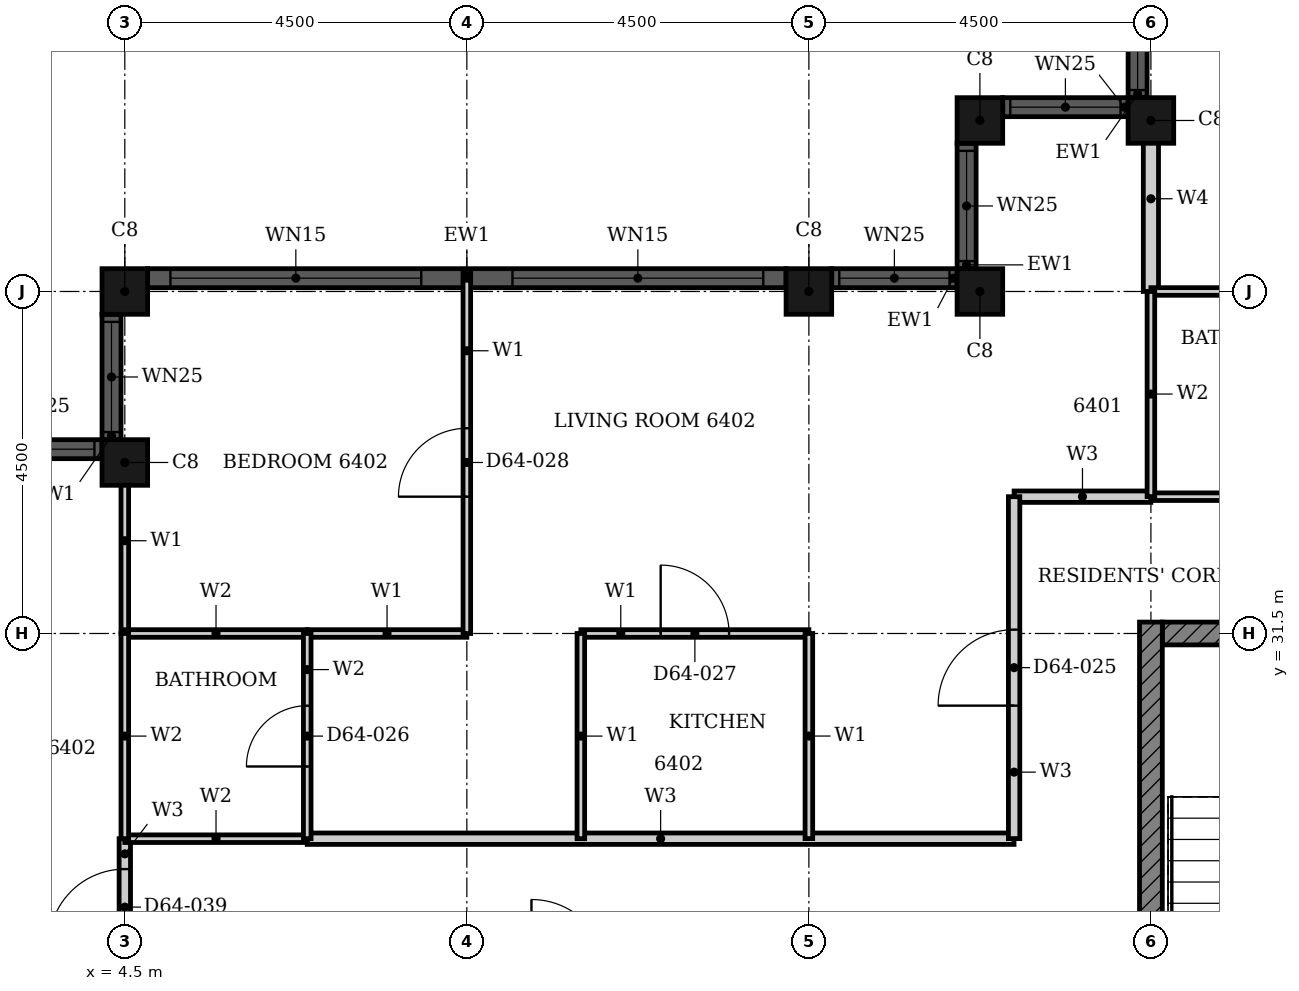
"""IFC4 building model, lengths in metres.
Left out: names, types, materials, properties, quantities, classifications, styles, units other than length and angle.
Written with IfcOpenShell. Run it as: python <this file> out.ifc"""

import sys

from ifc_helpers import new_model, si_unit, direction, frame, frame_2d, origin, origin_2d, place, context, subcontext, project, spatial, rectangle, hollow_rectangle, extrude, element, fill, save


model = new_model("IFC4")
c1 = context("Model", 3, precision=1e-05, world=origin(), true_north=direction((0.0, 1.0)))
c2 = subcontext(c1, "Body", "Model", "MODEL_VIEW")
j1 = project(units=[si_unit("LENGTHUNIT", "METRE"), si_unit("PLANEANGLEUNIT", "RADIAN")], contexts=[c1])
p1 = place(None, origin())
s1 = spatial("IfcSite", under=j1, at=p1, CompositionType="ELEMENT")
p2 = place(p1, origin())
s2 = spatial("IfcBuilding", under=s1, at=p2, CompositionType="ELEMENT")
p3 = place(p2, frame((0.0, 0.0, 252.7)))
s3 = spatial("IfcBuildingStorey", under=s2, at=p3, CompositionType="ELEMENT", Elevation=252.7)
for number, where, z_axis, x_axis in (
    (1, (18.0, 38.25, 0.0), (0.0, 0.0, 1.0), (1.0, 0.0, 0.0)),
    (2, (15.75, 38.25, 0.0), (0.0, 0.0, 1.0), (1.0, 0.0, 0.0)),
    (3, (15.75, 36.0, 0.0), (0.0, 0.0, 1.0), (1.0, 0.0, 0.0)),
    (4, (13.5, 36.0, 0.0), (0.0, 0.0, 1.0), (1.0, 0.0, 0.0)),
    (5, (4.5, 36.0, 0.0), (0.0, 0.0, 1.0), (1.0, 0.0, 0.0)),
    (6, (4.5, 33.75, 0.0), (0.0, 0.0, 1.0), (1.0, 0.0, 0.0)),
):
    element("IfcColumn", number, at=place(p3, frame(where, z_axis=z_axis, x_axis=x_axis)), inside=s3, PredefinedType="COLUMN", context=c2, shape_type="SweptSolid", body=[
        extrude(hollow_rectangle(XDim=0.6, YDim=0.6, WallThickness=0.02, at=origin_2d()), origin(), (0.0, 0.0, 1.0), 3.7),
    ])
p4 = place(p3, frame((17.825, 40.2, 0.0), z_axis=(0.0, 0.0, 1.0), x_axis=(0.0, -1.0, 0.0)))
e7 = element("IfcWall", 7, at=p4, inside=s3, PredefinedType="SOLIDWALL", context=c2, shape_type="SweptSolid", body=[
    extrude(rectangle(XDim=1.65, YDim=0.25, at=frame_2d((0.825, 0.0))), origin(), (0.0, 0.0, 1.0), 3.7),
])
p5 = place(p4, frame((0.1, 0.0, 0.9)))
e8 = element("IfcOpeningElement", 8, at=p5, cuts=e7, PredefinedType="OPENING", context=c2, shape_type="SweptSolid", body=[
    extrude(rectangle(XDim=1.45, YDim=1.85, at=frame_2d((0.725, 0.925))), frame((0.0, 0.135, 0.0), z_axis=(0.0, -1.0, 0.0), x_axis=(1.0, 0.0, 0.0)), (0.0, 0.0, 1.0), 0.27),
])
p6 = place(p3, frame((17.7, 38.425, 0.0), z_axis=(0.0, 0.0, 1.0), x_axis=(-1.0, 0.0, 0.0)))
e9 = element("IfcWall", 9, at=p6, inside=s3, PredefinedType="SOLIDWALL", context=c2, shape_type="SweptSolid", body=[
    extrude(rectangle(XDim=1.65, YDim=0.25, at=frame_2d((0.825, 0.0))), origin(), (0.0, 0.0, 1.0), 3.7),
])
p7 = place(p6, frame((0.1, 0.0, 0.9)))
e10 = element("IfcOpeningElement", 10, at=p7, cuts=e9, PredefinedType="OPENING", context=c2, shape_type="SweptSolid", body=[
    extrude(rectangle(XDim=1.45, YDim=1.85, at=frame_2d((0.725, 0.925))), frame((0.0, 0.135, 0.0), z_axis=(0.0, -1.0, 0.0), x_axis=(1.0, 0.0, 0.0)), (0.0, 0.0, 1.0), 0.27),
])
p8 = place(p3, frame((15.575, 37.95, 0.0), z_axis=(0.0, 0.0, 1.0), x_axis=(0.0, -1.0, 0.0)))
e11 = element("IfcWall", 11, at=p8, inside=s3, PredefinedType="SOLIDWALL", context=c2, shape_type="SweptSolid", body=[
    extrude(rectangle(XDim=1.65, YDim=0.25, at=frame_2d((0.825, 0.0))), origin(), (0.0, 0.0, 1.0), 3.7),
])
p9 = place(p8, frame((0.1, 0.0, 0.9)))
e12 = element("IfcOpeningElement", 12, at=p9, cuts=e11, PredefinedType="OPENING", context=c2, shape_type="SweptSolid", body=[
    extrude(rectangle(XDim=1.45, YDim=1.85, at=frame_2d((0.725, 0.925))), frame((0.0, 0.135, 0.0), z_axis=(0.0, -1.0, 0.0), x_axis=(1.0, 0.0, 0.0)), (0.0, 0.0, 1.0), 0.27),
])
p10 = place(p3, frame((15.45, 36.175, 0.0), z_axis=(0.0, 0.0, 1.0), x_axis=(-1.0, 0.0, 0.0)))
e13 = element("IfcWall", 13, at=p10, inside=s3, PredefinedType="SOLIDWALL", context=c2, shape_type="SweptSolid", body=[
    extrude(rectangle(XDim=1.65, YDim=0.25, at=frame_2d((0.825, 0.0))), origin(), (0.0, 0.0, 1.0), 3.7),
])
p11 = place(p10, frame((0.1, 0.0, 0.9)))
e14 = element("IfcOpeningElement", 14, at=p11, cuts=e13, PredefinedType="OPENING", context=c2, shape_type="SweptSolid", body=[
    extrude(rectangle(XDim=1.45, YDim=1.85, at=frame_2d((0.725, 0.925))), frame((0.0, 0.135, 0.0), z_axis=(0.0, -1.0, 0.0), x_axis=(1.0, 0.0, 0.0)), (0.0, 0.0, 1.0), 0.27),
])
p12 = place(p3, frame((13.2, 36.175, 0.0), z_axis=(0.0, 0.0, 1.0), x_axis=(-1.0, 0.0, 0.0)))
e15 = element("IfcWall", 15, at=p12, inside=s3, PredefinedType="SOLIDWALL", context=c2, shape_type="SweptSolid", body=[
    extrude(rectangle(XDim=8.4, YDim=0.25, at=frame_2d((4.2, 0.0))), origin(), (0.0, 0.0, 1.0), 3.7),
])
p13 = place(p12, frame((0.3, 0.0, 0.45)))
e16 = element("IfcOpeningElement", 16, at=p13, cuts=e15, PredefinedType="OPENING", context=c2, shape_type="SweptSolid", body=[
    extrude(rectangle(XDim=3.3, YDim=2.3, at=frame_2d((1.65, 1.15))), frame((0.0, 0.135, 0.0), z_axis=(0.0, -1.0, 0.0), x_axis=(1.0, 0.0, 0.0)), (0.0, 0.0, 1.0), 0.27),
])
p14 = place(p12, frame((4.8, 0.0, 0.45)))
e17 = element("IfcOpeningElement", 17, at=p14, cuts=e15, PredefinedType="OPENING", context=c2, shape_type="SweptSolid", body=[
    extrude(rectangle(XDim=3.3, YDim=2.3, at=frame_2d((1.65, 1.15))), frame((0.0, 0.135, 0.0), z_axis=(0.0, -1.0, 0.0), x_axis=(1.0, 0.0, 0.0)), (0.0, 0.0, 1.0), 0.27),
])
p15 = place(p3, frame((4.325, 35.7, 0.0), z_axis=(0.0, 0.0, 1.0), x_axis=(0.0, -1.0, 0.0)))
e18 = element("IfcWall", 18, at=p15, inside=s3, PredefinedType="SOLIDWALL", context=c2, shape_type="SweptSolid", body=[
    extrude(rectangle(XDim=1.65, YDim=0.25, at=frame_2d((0.825, 0.0))), origin(), (0.0, 0.0, 1.0), 3.7),
])
p16 = place(p15, frame((0.1, 0.0, 0.9)))
e19 = element("IfcOpeningElement", 19, at=p16, cuts=e18, PredefinedType="OPENING", context=c2, shape_type="SweptSolid", body=[
    extrude(rectangle(XDim=1.45, YDim=1.85, at=frame_2d((0.725, 0.925))), frame((0.0, 0.135, 0.0), z_axis=(0.0, -1.0, 0.0), x_axis=(1.0, 0.0, 0.0)), (0.0, 0.0, 1.0), 0.27),
])
p17 = place(p3, frame((4.2, 33.925, 0.0), z_axis=(0.0, 0.0, 1.0), x_axis=(-1.0, 0.0, 0.0)))
e20 = element("IfcWall", 20, at=p17, inside=s3, PredefinedType="SOLIDWALL", context=c2, shape_type="SweptSolid", body=[
    extrude(rectangle(XDim=1.65, YDim=0.25, at=frame_2d((0.825, 0.0))), origin(), (0.0, 0.0, 1.0), 3.7),
])
p18 = place(p17, frame((0.1, 0.0, 0.9)))
e21 = element("IfcOpeningElement", 21, at=p18, cuts=e20, PredefinedType="OPENING", context=c2, shape_type="SweptSolid", body=[
    extrude(rectangle(XDim=1.45, YDim=1.85, at=frame_2d((0.725, 0.925))), frame((0.0, 0.135, 0.0), z_axis=(0.0, -1.0, 0.0), x_axis=(1.0, 0.0, 0.0)), (0.0, 0.0, 1.0), 0.27),
])
p19 = place(p3, frame((18.15, 31.5, 0.0), z_axis=(0.0, 0.0, 1.0), x_axis=(1.0, 0.0, 0.0)))
e22 = element("IfcWall", 22, at=p19, inside=s3, PredefinedType="SHEAR", context=c2, shape_type="SweptSolid", body=[
    extrude(rectangle(XDim=9.368, YDim=0.3, at=frame_2d((4.684, 0.0))), origin(), (0.0, 0.0, 1.0), 3.4),
])
p20 = place(p19, frame((4.736, 0.0, 0.0)))
e23 = element("IfcOpeningElement", 23, at=p20, cuts=e22, PredefinedType="OPENING", context=c2, shape_type="SweptSolid", body=[
    extrude(rectangle(XDim=1.8, YDim=2.1, at=frame_2d((0.9, 1.05))), frame((0.0, 0.16, 0.0), z_axis=(0.0, -1.0, 0.0), x_axis=(1.0, 0.0, 0.0)), (0.0, 0.0, 1.0), 0.32),
])
p21 = place(p3, frame((18.0, 22.35, 0.0), z_axis=(0.0, 0.0, 1.0), x_axis=(0.0, 1.0, 0.0)))
e24 = element("IfcWall", 24, at=p21, inside=s3, PredefinedType="SHEAR", context=c2, shape_type="SweptSolid", body=[
    extrude(rectangle(XDim=9.3, YDim=0.3, at=frame_2d((4.65, 0.0))), origin(), (0.0, 0.0, 1.0), 3.4),
])
p22 = place(p3, frame((6.9, 28.8, 0.0), z_axis=(0.0, 0.0, 1.0), x_axis=(1.0, 0.0, 0.0)))
e25 = element("IfcWall", 25, at=p22, inside=s3, PredefinedType="PARTITIONING", context=c2, shape_type="SweptSolid", body=[
    extrude(rectangle(XDim=9.299, YDim=0.15, at=frame_2d((4.649, 0.0))), origin(), (0.0, 0.0, 1.0), 3.4),
])
p23 = place(p3, frame((16.2, 33.3, 0.0), z_axis=(0.0, 0.0, 1.0), x_axis=(1.0, 0.0, 0.0)))
e26 = element("IfcWall", 26, at=p23, inside=s3, PredefinedType="PARTITIONING", context=c2, shape_type="SweptSolid", body=[
    extrude(rectangle(XDim=1.799, YDim=0.15, at=frame_2d((0.899, 0.0))), origin(), (0.0, 0.0, 1.0), 3.4),
])
p24 = place(p3, frame((16.2, 28.801, 0.0), z_axis=(0.0, 0.0, 1.0), x_axis=(0.0, 1.0, 0.0)))
e27 = element("IfcWall", 27, at=p24, inside=s3, PredefinedType="PARTITIONING", context=c2, shape_type="SweptSolid", body=[
    extrude(rectangle(XDim=4.499, YDim=0.15, at=frame_2d((2.25, 0.0))), origin(), (0.0, 0.0, 1.0), 3.4),
])
p25 = place(p24, frame((1.75, 0.0, 0.0)))
e28 = element("IfcOpeningElement", 28, at=p25, cuts=e27, PredefinedType="OPENING", context=c2, shape_type="SweptSolid", body=[
    extrude(rectangle(XDim=1.0, YDim=2.2, at=frame_2d((0.5, 1.1))), frame((0.0, 0.085, 0.0), z_axis=(0.0, -1.0, 0.0), x_axis=(1.0, 0.0, 0.0)), (0.0, 0.0, 1.0), 0.17),
])
p26 = place(p3, frame((4.5, 27.0, 0.0), z_axis=(0.0, 0.0, 1.0), x_axis=(0.0, 1.0, 0.0)))
e29 = element("IfcWall", 29, at=p26, inside=s3, PredefinedType="PARTITIONING", context=c2, shape_type="SweptSolid", body=[
    extrude(rectangle(XDim=1.8, YDim=0.15, at=frame_2d((0.9, 0.0))), origin(), (0.0, 0.0, 1.0), 3.4),
])
p27 = place(p26, frame((0.4, 0.0, 0.0)))
e30 = element("IfcOpeningElement", 30, at=p27, cuts=e29, PredefinedType="OPENING", context=c2, shape_type="SweptSolid", body=[
    extrude(rectangle(XDim=1.0, YDim=2.1, at=frame_2d((0.5, 1.05))), frame((0.0, 0.085, 0.0), z_axis=(0.0, -1.0, 0.0), x_axis=(1.0, 0.0, 0.0)), (0.0, 0.0, 1.0), 0.17),
])
p28 = place(p3, frame((6.9, 31.5, 0.0), z_axis=(0.0, 0.0, 1.0), x_axis=(1.0, 0.0, 0.0)))
e31 = element("IfcWall", 31, at=p28, inside=s3, PredefinedType="PARTITIONING", context=c2, shape_type="SweptSolid", body=[
    extrude(rectangle(XDim=2.1, YDim=0.1, at=frame_2d((1.05, 0.0))), origin(), (0.0, 0.0, 1.0), 2.68),
])
p29 = place(p3, frame((10.5, 31.5, 0.0), z_axis=(0.0, 0.0, 1.0), x_axis=(1.0, 0.0, 0.0)))
e32 = element("IfcWall", 32, at=p29, inside=s3, PredefinedType="PARTITIONING", context=c2, shape_type="SweptSolid", body=[
    extrude(rectangle(XDim=3.0, YDim=0.1, at=frame_2d((1.5, 0.0))), origin(), (0.0, 0.0, 1.0), 2.68),
])
p30 = place(p29, frame((1.05, 0.0, 0.0)))
e33 = element("IfcOpeningElement", 33, at=p30, cuts=e32, PredefinedType="OPENING", context=c2, shape_type="SweptSolid", body=[
    extrude(rectangle(XDim=0.9, YDim=2.1, at=frame_2d((0.45, 1.05))), frame((0.0, 0.06, 0.0), z_axis=(0.0, -1.0, 0.0), x_axis=(1.0, 0.0, 0.0)), (0.0, 0.0, 1.0), 0.12),
])
p31 = place(p3, frame((10.5, 28.8, 0.0), z_axis=(0.0, 0.0, 1.0), x_axis=(0.0, 1.0, 0.0)))
e34 = element("IfcWall", 34, at=p31, inside=s3, PredefinedType="PARTITIONING", context=c2, shape_type="SweptSolid", body=[
    extrude(rectangle(XDim=2.7, YDim=0.1, at=frame_2d((1.35, 0.0))), origin(), (0.0, 0.0, 1.0), 3.4),
])
p32 = place(p3, frame((13.5, 28.801, 0.0), z_axis=(0.0, 0.0, 1.0), x_axis=(0.0, 1.0, 0.0)))
e35 = element("IfcWall", 35, at=p32, inside=s3, PredefinedType="PARTITIONING", context=c2, shape_type="SweptSolid", body=[
    extrude(rectangle(XDim=2.699, YDim=0.1, at=frame_2d((1.35, 0.0))), origin(), (0.0, 0.0, 1.0), 2.48),
])
p33 = place(p3, frame((4.5, 31.501, 0.0), z_axis=(0.0, 0.0, 1.0), x_axis=(0.0, 1.0, 0.0)))
e36 = element("IfcWall", 36, at=p33, inside=s3, PredefinedType="PARTITIONING", context=c2, shape_type="SweptSolid", body=[
    extrude(rectangle(XDim=2.439, YDim=0.1, at=frame_2d((1.219, 0.0))), origin(), (0.0, 0.0, 1.0), 3.4),
])
p34 = place(p3, frame((9.0, 31.5, 0.0), z_axis=(0.0, 0.0, 1.0), x_axis=(0.0, 1.0, 0.0)))
e37 = element("IfcWall", 37, at=p34, inside=s3, PredefinedType="PARTITIONING", context=c2, shape_type="SweptSolid", body=[
    extrude(rectangle(XDim=4.74, YDim=0.1, at=frame_2d((2.37, 0.0))), origin(), (0.0, 0.0, 1.0), 3.4),
])
p35 = place(p34, frame((1.8, 0.0, 0.0)))
e38 = element("IfcOpeningElement", 38, at=p35, cuts=e37, PredefinedType="OPENING", context=c2, shape_type="SweptSolid", body=[
    extrude(rectangle(XDim=0.9, YDim=2.1, at=frame_2d((0.45, 1.05))), frame((0.0, 0.06, 0.0), z_axis=(0.0, -1.0, 0.0), x_axis=(1.0, 0.0, 0.0)), (0.0, 0.0, 1.0), 0.12),
])
p36 = place(p3, frame((18.0, 36.0, 0.0), z_axis=(0.0, 0.0, 1.0), x_axis=(0.0, 1.0, 0.0)))
e39 = element("IfcWall", 39, at=p36, inside=s3, PredefinedType="PARTITIONING", context=c2, shape_type="SweptSolid", body=[
    extrude(rectangle(XDim=2.44, YDim=0.2, at=frame_2d((1.22, 0.0))), origin(), (0.0, 0.0, 1.0), 3.4),
])
p37 = place(p3, frame((4.5, 28.8, 0.0), z_axis=(0.0, 0.0, 1.0), x_axis=(1.0, 0.0, 0.0)))
e40 = element("IfcWall", 40, at=p37, inside=s3, PredefinedType="PARTITIONING", context=c2, shape_type="SweptSolid", body=[
    extrude(rectangle(XDim=2.4, YDim=0.1, at=frame_2d((1.2, 0.0))), origin(), (0.0, 0.0, 1.0), 3.4),
])
p38 = place(p3, frame((4.5, 31.5, 0.0), z_axis=(0.0, 0.0, 1.0), x_axis=(1.0, 0.0, 0.0)))
e41 = element("IfcWall", 41, at=p38, inside=s3, PredefinedType="PARTITIONING", context=c2, shape_type="SweptSolid", body=[
    extrude(rectangle(XDim=2.4, YDim=0.1, at=frame_2d((1.2, 0.0))), origin(), (0.0, 0.0, 1.0), 2.68),
])
for number, where, z_axis, x_axis in (
    (42, (18.0, 33.3, 0.0), (0.0, 0.0, 1.0), (1.0, 0.0, 0.0)),
    (43, (18.0, 36.0, 0.0), (0.0, 0.0, 1.0), (1.0, 0.0, 0.0)),
):
    element("IfcWall", number, at=place(p3, frame(where, z_axis=z_axis, x_axis=x_axis)), inside=s3, PredefinedType="PARTITIONING", context=c2, shape_type="SweptSolid", body=[
        extrude(rectangle(XDim=2.4, YDim=0.1, at=frame_2d((1.2, 0.0))), origin(), (0.0, 0.0, 1.0), 3.4),
    ])
p39 = place(p3, frame((18.0, 33.301, 0.0), z_axis=(0.0, 0.0, 1.0), x_axis=(0.0, 1.0, 0.0)))
e44 = element("IfcWall", 44, at=p39, inside=s3, PredefinedType="PARTITIONING", context=c2, shape_type="SweptSolid", body=[
    extrude(rectangle(XDim=2.699, YDim=0.1, at=frame_2d((1.35, 0.0))), origin(), (0.0, 0.0, 1.0), 3.4),
])
p40 = place(p3, frame((4.5, 28.8, 0.0), z_axis=(0.0, 0.0, 1.0), x_axis=(0.0, 1.0, 0.0)))
e45 = element("IfcWall", 45, at=p40, inside=s3, PredefinedType="PARTITIONING", context=c2, shape_type="SweptSolid", body=[
    extrude(rectangle(XDim=2.7, YDim=0.1, at=frame_2d((1.35, 0.0))), origin(), (0.0, 0.0, 1.0), 3.4),
])
p41 = place(p3, frame((6.9, 28.8, 0.0), z_axis=(0.0, 0.0, 1.0), x_axis=(0.0, 1.0, 0.0)))
e46 = element("IfcWall", 46, at=p41, inside=s3, PredefinedType="PARTITIONING", context=c2, shape_type="SweptSolid", body=[
    extrude(rectangle(XDim=2.7, YDim=0.1, at=frame_2d((1.35, 0.0))), origin(), (0.0, 0.0, 1.0), 3.4),
])
p42 = place(p41, frame((0.95, 0.0, 0.0)))
e47 = element("IfcOpeningElement", 47, at=p42, cuts=e46, PredefinedType="OPENING", context=c2, shape_type="SweptSolid", body=[
    extrude(rectangle(XDim=0.8, YDim=2.1, at=frame_2d((0.4, 1.05))), frame((0.0, 0.06, 0.0), z_axis=(0.0, -1.0, 0.0), x_axis=(1.0, 0.0, 0.0)), (0.0, 0.0, 1.0), 0.12),
])
p43 = place(p5, origin())
e48 = element("IfcWindow", 48, at=p43, inside=s3, PartitioningType="SINGLE_PANEL", PredefinedType="WINDOW", context=c2, shape_type="SweptSolid", body=[
    extrude(rectangle(XDim=1.45, YDim=1.85, at=frame_2d((0.725, 0.925))), frame((0.0, 0.03, 0.0), z_axis=(0.0, -1.0, 0.0), x_axis=(1.0, 0.0, 0.0)), (0.0, 0.0, 1.0), 0.06),
])
fill(e8, e48)
p44 = place(p7, origin())
e49 = element("IfcWindow", 49, at=p44, inside=s3, PartitioningType="SINGLE_PANEL", PredefinedType="WINDOW", context=c2, shape_type="SweptSolid", body=[
    extrude(rectangle(XDim=1.45, YDim=1.85, at=frame_2d((0.725, 0.925))), frame((0.0, 0.03, 0.0), z_axis=(0.0, -1.0, 0.0), x_axis=(1.0, 0.0, 0.0)), (0.0, 0.0, 1.0), 0.06),
])
fill(e10, e49)
p45 = place(p9, origin())
e50 = element("IfcWindow", 50, at=p45, inside=s3, PartitioningType="SINGLE_PANEL", PredefinedType="WINDOW", context=c2, shape_type="SweptSolid", body=[
    extrude(rectangle(XDim=1.45, YDim=1.85, at=frame_2d((0.725, 0.925))), frame((0.0, 0.03, 0.0), z_axis=(0.0, -1.0, 0.0), x_axis=(1.0, 0.0, 0.0)), (0.0, 0.0, 1.0), 0.06),
])
fill(e12, e50)
p46 = place(p11, origin())
e51 = element("IfcWindow", 51, at=p46, inside=s3, PartitioningType="SINGLE_PANEL", PredefinedType="WINDOW", context=c2, shape_type="SweptSolid", body=[
    extrude(rectangle(XDim=1.45, YDim=1.85, at=frame_2d((0.725, 0.925))), frame((0.0, 0.03, 0.0), z_axis=(0.0, -1.0, 0.0), x_axis=(1.0, 0.0, 0.0)), (0.0, 0.0, 1.0), 0.06),
])
fill(e14, e51)
p47 = place(p13, origin())
e52 = element("IfcWindow", 52, at=p47, inside=s3, PartitioningType="SINGLE_PANEL", PredefinedType="WINDOW", context=c2, shape_type="SweptSolid", body=[
    extrude(rectangle(XDim=3.3, YDim=2.3, at=frame_2d((1.65, 1.15))), frame((0.0, 0.03, 0.0), z_axis=(0.0, -1.0, 0.0), x_axis=(1.0, 0.0, 0.0)), (0.0, 0.0, 1.0), 0.06),
])
fill(e16, e52)
p48 = place(p14, origin())
e53 = element("IfcWindow", 53, at=p48, inside=s3, PartitioningType="SINGLE_PANEL", PredefinedType="WINDOW", context=c2, shape_type="SweptSolid", body=[
    extrude(rectangle(XDim=3.3, YDim=2.3, at=frame_2d((1.65, 1.15))), frame((0.0, 0.03, 0.0), z_axis=(0.0, -1.0, 0.0), x_axis=(1.0, 0.0, 0.0)), (0.0, 0.0, 1.0), 0.06),
])
fill(e17, e53)
p49 = place(p16, origin())
e54 = element("IfcWindow", 54, at=p49, inside=s3, PartitioningType="SINGLE_PANEL", PredefinedType="WINDOW", context=c2, shape_type="SweptSolid", body=[
    extrude(rectangle(XDim=1.45, YDim=1.85, at=frame_2d((0.725, 0.925))), frame((0.0, 0.03, 0.0), z_axis=(0.0, -1.0, 0.0), x_axis=(1.0, 0.0, 0.0)), (0.0, 0.0, 1.0), 0.06),
])
fill(e19, e54)
p50 = place(p18, origin())
e55 = element("IfcWindow", 55, at=p50, inside=s3, PartitioningType="SINGLE_PANEL", PredefinedType="WINDOW", context=c2, shape_type="SweptSolid", body=[
    extrude(rectangle(XDim=1.45, YDim=1.85, at=frame_2d((0.725, 0.925))), frame((0.0, 0.03, 0.0), z_axis=(0.0, -1.0, 0.0), x_axis=(1.0, 0.0, 0.0)), (0.0, 0.0, 1.0), 0.06),
])
fill(e21, e55)
p51 = place(p25, origin())
e56 = element("IfcDoor", 56, at=p51, inside=s3, OperationType="SINGLE_SWING_LEFT", PredefinedType="DOOR", context=c2, shape_type="SweptSolid", body=[
    extrude(rectangle(XDim=1.0, YDim=2.2, at=frame_2d((0.5, 1.1))), frame((0.0, 0.025, 0.0), z_axis=(0.0, -1.0, 0.0), x_axis=(1.0, 0.0, 0.0)), (0.0, 0.0, 1.0), 0.05),
])
fill(e28, e56)
p52 = place(p42, origin())
e57 = element("IfcDoor", 57, at=p52, inside=s3, OperationType="SINGLE_SWING_RIGHT", PredefinedType="DOOR", context=c2, shape_type="SweptSolid", body=[
    extrude(rectangle(XDim=0.8, YDim=2.1, at=frame_2d((0.4, 1.05))), frame((0.0, 0.025, 0.0), z_axis=(0.0, -1.0, 0.0), x_axis=(1.0, 0.0, 0.0)), (0.0, 0.0, 1.0), 0.05),
])
fill(e47, e57)
p53 = place(p30, origin())
e58 = element("IfcDoor", 58, at=p53, inside=s3, OperationType="SINGLE_SWING_RIGHT", PredefinedType="DOOR", context=c2, shape_type="SweptSolid", body=[
    extrude(rectangle(XDim=0.9, YDim=2.1, at=frame_2d((0.45, 1.05))), frame((0.0, 0.025, 0.0), z_axis=(0.0, -1.0, 0.0), x_axis=(1.0, 0.0, 0.0)), (0.0, 0.0, 1.0), 0.05),
])
fill(e33, e58)
p54 = place(p35, origin())
e59 = element("IfcDoor", 59, at=p54, inside=s3, OperationType="SINGLE_SWING_RIGHT", PredefinedType="DOOR", context=c2, shape_type="SweptSolid", body=[
    extrude(rectangle(XDim=0.9, YDim=2.1, at=frame_2d((0.45, 1.05))), frame((0.0, 0.025, 0.0), z_axis=(0.0, -1.0, 0.0), x_axis=(1.0, 0.0, 0.0)), (0.0, 0.0, 1.0), 0.05),
])
fill(e38, e59)
p55 = place(p27, origin())
e60 = element("IfcDoor", 60, at=p55, inside=s3, OperationType="SINGLE_SWING_RIGHT", PredefinedType="DOOR", context=c2, shape_type="SweptSolid", body=[
    extrude(rectangle(XDim=1.0, YDim=2.1, at=frame_2d((0.5, 1.05))), frame((0.0, 0.025, 0.0), z_axis=(0.0, -1.0, 0.0), x_axis=(1.0, 0.0, 0.0)), (0.0, 0.0, 1.0), 0.05),
])
fill(e30, e60)
save(model, sys.argv[1])
